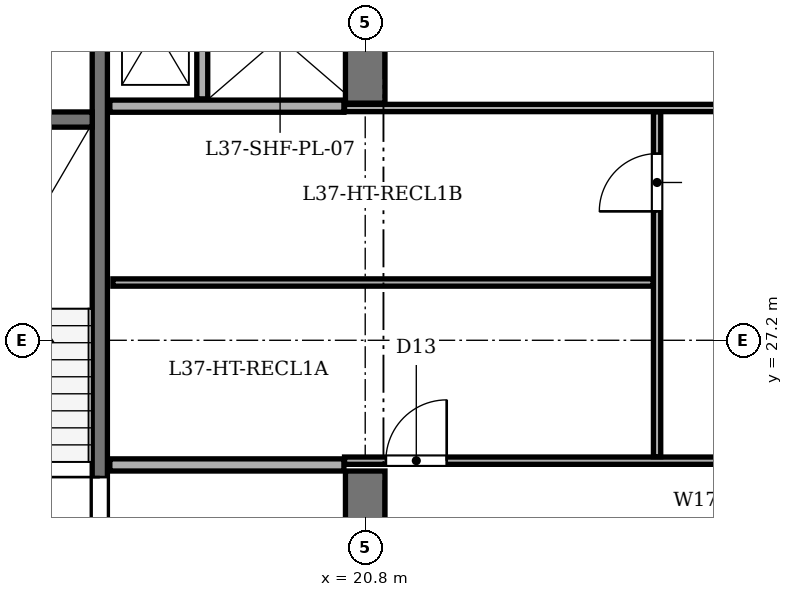
"""IFC4 building model, lengths in metres.
Left out: names, types, materials, properties, quantities, classifications, styles, units other than length and angle.
Written with IfcOpenShell. Run it as: python <this file> out.ifc"""

import sys

from ifc_helpers import new_model, si_unit, direction, frame, frame_2d, origin, place, context, subcontext, project, spatial, rectangle, extrude, element, fill, save


model = new_model("IFC4")
c1 = context("Model", 3, precision=1e-05, world=origin(), true_north=direction((0.0, 1.0)))
c2 = subcontext(c1, "Body", "Model", "MODEL_VIEW")
j1 = project(units=[si_unit("LENGTHUNIT", "METRE"), si_unit("PLANEANGLEUNIT", "RADIAN")], contexts=[c1])
p1 = place(None, origin())
s1 = spatial("IfcSite", under=j1, at=p1, CompositionType="ELEMENT")
p2 = place(p1, origin())
s2 = spatial("IfcBuilding", under=s1, at=p2, CompositionType="ELEMENT")
p3 = place(p2, frame((0.0, 0.0, 148.3)))
s3 = spatial("IfcBuildingStorey", under=s2, at=p3, CompositionType="ELEMENT", Elevation=148.3)
p4 = place(p3, frame((20.8, 21.305, 0.0), z_axis=(0.0, 0.0, 1.0), x_axis=(0.0, 1.0, 0.0)))
e1 = element("IfcWall", 1, at=p4, inside=s3, PredefinedType="SHEAR", context=c2, shape_type="SweptSolid", body=[
    extrude(rectangle(XDim=3.745, YDim=0.65, at=frame_2d((1.873, 0.0))), origin(), (0.0, 0.0, 1.0), 3.2),
])
p5 = place(p4, frame((1.295, 0.0, 0.0)))
e2 = element("IfcOpeningElement", 2, at=p5, cuts=e1, PredefinedType="OPENING", context=c2, shape_type="SweptSolid", body=[
    extrude(rectangle(XDim=1.2, YDim=2.15, at=frame_2d((0.6, 1.075))), frame((0.0, 0.335, 0.0), z_axis=(0.0, -1.0, 0.0), x_axis=(1.0, 0.0, 0.0)), (0.0, 0.0, 1.0), 0.67),
])
p6 = place(p3, frame((20.8, 31.1, 0.0), z_axis=(0.0, 0.0, 1.0), x_axis=(0.0, 1.0, 0.0)))
e3 = element("IfcWall", 3, at=p6, inside=s3, PredefinedType="SHEAR", context=c2, shape_type="SweptSolid", body=[
    extrude(rectangle(XDim=1.995, YDim=0.65, at=frame_2d((0.998, 0.0))), origin(), (0.0, 0.0, 1.0), 3.2),
])
p7 = place(p3, frame((16.435, 21.135, 0.0), z_axis=(0.0, 0.0, 1.0), x_axis=(0.0, 1.0, 0.0)))
e4 = element("IfcWall", 4, at=p7, inside=s3, PredefinedType="SHEAR", context=c2, shape_type="SweptSolid", body=[
    extrude(rectangle(XDim=12.13, YDim=0.25, at=frame_2d((6.065, 0.0))), origin(), (0.0, 0.0, 1.0), 3.2),
])
p8 = place(p7, frame((0.515, 0.0, 0.0)))
e5 = element("IfcOpeningElement", 5, at=p8, cuts=e4, PredefinedType="OPENING", context=c2, shape_type="SweptSolid", body=[
    extrude(rectangle(XDim=1.2, YDim=2.15, at=frame_2d((0.6, 1.075))), frame((0.0, 0.135, 0.0), z_axis=(0.0, -1.0, 0.0), x_axis=(1.0, 0.0, 0.0)), (0.0, 0.0, 1.0), 0.27),
])
p9 = place(p7, frame((2.665, 0.0, 0.0)))
e6 = element("IfcOpeningElement", 6, at=p9, cuts=e4, PredefinedType="OPENING", context=c2, shape_type="SweptSolid", body=[
    extrude(rectangle(XDim=1.15, YDim=2.15, at=frame_2d((0.575, 1.075))), frame((0.0, 0.135, 0.0), z_axis=(0.0, -1.0, 0.0), x_axis=(1.0, 0.0, 0.0)), (0.0, 0.0, 1.0), 0.27),
])
p10 = place(p3, frame((13.135, 30.83, 0.0), z_axis=(0.0, 0.0, 1.0), x_axis=(1.0, 0.0, 0.0)))
e7 = element("IfcWall", 7, at=p10, inside=s3, PredefinedType="SHEAR", context=c2, shape_type="SweptSolid", body=[
    extrude(rectangle(XDim=3.175, YDim=0.25, at=frame_2d((1.587, 0.0))), origin(), (0.0, 0.0, 1.0), 3.2),
])
for number, where, z_axis, x_axis in (
    (8, (16.6, 25.15, 0.0), (0.0, 0.0, 1.0), (1.0, 0.0, 0.0)),
    (9, (16.6, 31.05, 0.0), (0.0, 0.0, 1.0), (1.0, 0.0, 0.0)),
):
    element("IfcWall", number, at=place(p3, frame(where, z_axis=z_axis, x_axis=x_axis)), inside=s3, PredefinedType="SOLIDWALL", context=c2, shape_type="SweptSolid", body=[
        extrude(rectangle(XDim=3.85, YDim=0.2, at=frame_2d((1.925, 0.0))), origin(), (0.0, 0.0, 1.0), 3.2),
    ])
p11 = place(p3, frame((18.12, 31.17, 0.0), z_axis=(0.0, 0.0, 1.0), x_axis=(0.0, 1.0, 0.0)))
e10 = element("IfcWall", 10, at=p11, inside=s3, PredefinedType="PARTITIONING", context=c2, shape_type="SweptSolid", body=[
    extrude(rectangle(XDim=2.095, YDim=0.18, at=frame_2d((1.047, 0.0))), origin(), (0.0, 0.0, 1.0), 3.2),
])
p12 = place(p3, frame((20.46, 25.22, 0.0), z_axis=(0.0, 0.0, 1.0), x_axis=(1.0, 0.0, 0.0)))
e11 = element("IfcWall", 11, at=p12, inside=s3, PredefinedType="PARTITIONING", context=c2, shape_type="SweptSolid", body=[
    extrude(rectangle(XDim=11.94, YDim=0.12, at=frame_2d((5.97, 0.0))), origin(), (0.0, 0.0, 1.0), 3.2),
])
p13 = place(p12, frame((0.68, 0.0, 0.0)))
e12 = element("IfcOpeningElement", 12, at=p13, cuts=e11, PredefinedType="OPENING", context=c2, shape_type="SweptSolid", body=[
    extrude(rectangle(XDim=1.0, YDim=2.1, at=frame_2d((0.5, 1.05))), frame((0.0, 0.07, 0.0), z_axis=(0.0, -1.0, 0.0), x_axis=(1.0, 0.0, 0.0)), (0.0, 0.0, 1.0), 0.14),
])
p14 = place(p3, frame((20.46, 31.02, 0.0), z_axis=(0.0, 0.0, 1.0), x_axis=(1.0, 0.0, 0.0)))
e13 = element("IfcWall", 13, at=p14, inside=s3, PredefinedType="PARTITIONING", context=c2, shape_type="SweptSolid", body=[
    extrude(rectangle(XDim=11.94, YDim=0.12, at=frame_2d((5.97, 0.0))), origin(), (0.0, 0.0, 1.0), 3.2),
])
p15 = place(p3, frame((25.6, 25.285, 0.0), z_axis=(0.0, 0.0, 1.0), x_axis=(0.0, 1.0, 0.0)))
e14 = element("IfcWall", 14, at=p15, inside=s3, PredefinedType="PARTITIONING", context=c2, shape_type="SweptSolid", body=[
    extrude(rectangle(XDim=5.67, YDim=0.12, at=frame_2d((2.835, 0.0))), origin(), (0.0, 0.0, 1.0), 3.2),
])
p16 = place(p15, frame((4.035, 0.0, 0.0)))
e15 = element("IfcOpeningElement", 15, at=p16, cuts=e14, PredefinedType="OPENING", context=c2, shape_type="SweptSolid", body=[
    extrude(rectangle(XDim=0.95, YDim=2.1, at=frame_2d((0.475, 1.05))), frame((0.0, 0.07, 0.0), z_axis=(0.0, -1.0, 0.0), x_axis=(1.0, 0.0, 0.0)), (0.0, 0.0, 1.0), 0.14),
])
p17 = place(p3, frame((16.65, 28.15, 0.0), z_axis=(0.0, 0.0, 1.0), x_axis=(1.0, 0.0, 0.0)))
e16 = element("IfcWall", 16, at=p17, inside=s3, PredefinedType="PARTITIONING", context=c2, shape_type="SweptSolid", body=[
    extrude(rectangle(XDim=8.885, YDim=0.12, at=frame_2d((4.442, 0.0))), origin(), (0.0, 0.0, 1.0), 3.2),
])
p18 = place(p9, origin())
e17 = element("IfcDoor", 17, at=p18, inside=s3, OperationType="SINGLE_SWING_RIGHT", PredefinedType="DOOR", context=c2, shape_type="SweptSolid", body=[
    extrude(rectangle(XDim=1.15, YDim=2.15, at=frame_2d((0.575, 1.075))), frame((0.0, 0.025, 0.0), z_axis=(0.0, -1.0, 0.0), x_axis=(1.0, 0.0, 0.0)), (0.0, 0.0, 1.0), 0.05),
])
fill(e6, e17)
p19 = place(p13, origin())
e18 = element("IfcDoor", 18, at=p19, inside=s3, OperationType="SINGLE_SWING_RIGHT", PredefinedType="DOOR", context=c2, shape_type="SweptSolid", body=[
    extrude(rectangle(XDim=1.0, YDim=2.1, at=frame_2d((0.5, 1.05))), frame((0.0, 0.025, 0.0), z_axis=(0.0, -1.0, 0.0), x_axis=(1.0, 0.0, 0.0)), (0.0, 0.0, 1.0), 0.05),
])
fill(e12, e18)
p20 = place(p16, origin())
e19 = element("IfcDoor", 19, at=p20, inside=s3, OperationType="SINGLE_SWING_LEFT", PredefinedType="DOOR", context=c2, shape_type="SweptSolid", body=[
    extrude(rectangle(XDim=0.95, YDim=2.1, at=frame_2d((0.475, 1.05))), frame((0.0, 0.025, 0.0), z_axis=(0.0, -1.0, 0.0), x_axis=(1.0, 0.0, 0.0)), (0.0, 0.0, 1.0), 0.05),
])
fill(e15, e19)
save(model, sys.argv[1])
